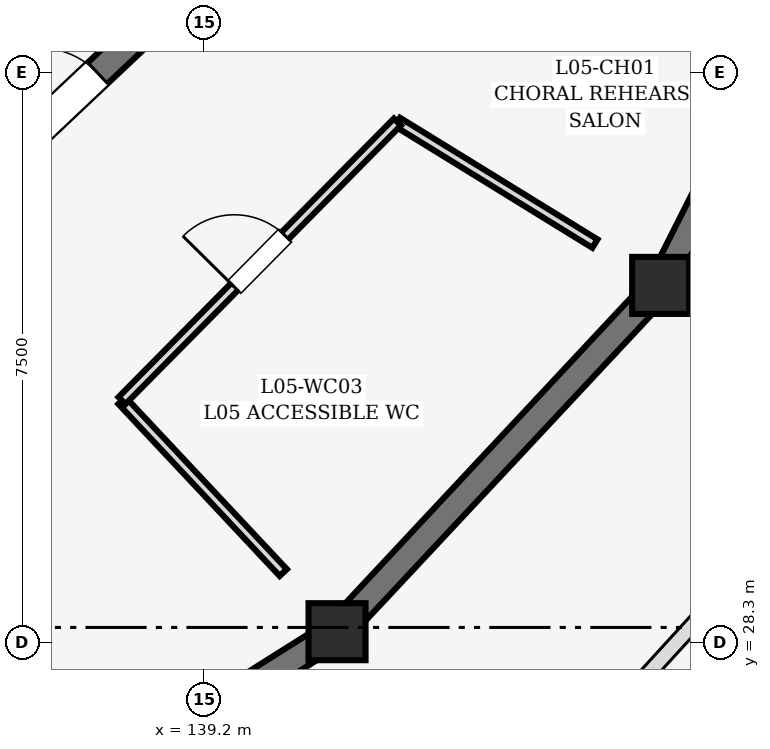
"""IFC4 building model, lengths in metres.
Left out: names, types, materials, properties, quantities, classifications, styles, units other than length and angle.
Written with IfcOpenShell. Run it as: python <this file> out.ifc"""

import sys

from ifc_helpers import new_model, si_unit, direction, frame, frame_2d, origin, origin_2d, place, context, subcontext, project, spatial, rectangle, circle, extrude, element, fill, save


model = new_model("IFC4")
c1 = context("Model", 3, precision=1e-05, world=origin(), true_north=direction((0.0, 1.0)))
c2 = subcontext(c1, "Body", "Model", "MODEL_VIEW")
j1 = project(units=[si_unit("LENGTHUNIT", "METRE"), si_unit("PLANEANGLEUNIT", "RADIAN")], contexts=[c1])
p1 = place(None, origin())
s1 = spatial("IfcSite", under=j1, at=p1, CompositionType="ELEMENT")
p2 = place(p1, origin())
s2 = spatial("IfcBuilding", under=s1, at=p2, CompositionType="ELEMENT")
p3 = place(p2, frame((0.0, 0.0, 19.2)))
s3 = spatial("IfcBuildingStorey", under=s2, at=p3, CompositionType="ELEMENT", Elevation=19.2)
for number, where, z_axis, x_axis in (
    (1, (140.951, 28.444, 0.0), (0.0, 0.0, 1.0), (1.0, 0.0, 0.0)),
    (2, (145.209, 33.0, 0.0), (0.0, 0.0, 1.0), (1.0, 0.0, 0.0)),
):
    element("IfcColumn", number, at=place(p3, frame(where, z_axis=z_axis, x_axis=x_axis)), inside=s3, PredefinedType="COLUMN", context=c2, shape_type="SweptSolid", body=[
        extrude(circle(Radius=0.375, at=origin_2d()), origin(), (0.0, 0.0, 1.0), 4.5),
    ])
p4 = place(p3, frame((135.662, 25.113, 0.0), z_axis=(0.0, 0.0, 1.0), x_axis=(0.846113390603, 0.53300293643, 0.0)))
e3 = element("IfcWall", 3, at=p4, inside=s3, PredefinedType="SHEAR", context=c2, shape_type="SweptSolid", body=[
    extrude(rectangle(XDim=5.94, YDim=0.35, at=frame_2d((2.97, 0.0))), origin(), (0.0, 0.0, 1.0), 4.23),
])
p5 = place(p3, frame((136.066, 34.155, 0.0), z_axis=(0.0, 0.0, 1.0), x_axis=(0.727127996206, 0.686501913423, 0.0)))
e4 = element("IfcWall", 4, at=p5, inside=s3, PredefinedType="SOLIDWALL", context=c2, shape_type="SweptSolid", body=[
    extrude(rectangle(XDim=3.714, YDim=0.38, at=frame_2d((1.857, 0.0))), origin(), (0.0, 0.0, 1.0), 4.25),
])
p6 = place(p5, frame((1.327, 0.0, 0.0)))
e5 = element("IfcOpeningElement", 5, at=p6, cuts=e4, PredefinedType="OPENING", context=c2, shape_type="SweptSolid", body=[
    extrude(rectangle(XDim=1.06, YDim=2.24, at=frame_2d((0.53, 1.12))), frame((0.0, 0.202, 0.0), z_axis=(0.0, -1.0, 0.0), x_axis=(1.0, 0.0, 0.0)), (0.0, 0.0, 1.0), 0.404),
])
p7 = place(p3, frame((141.162, 28.67, 0.0), z_axis=(0.0, 0.0, 1.0), x_axis=(0.682886399388, 0.730524582427, 0.0)))
e6 = element("IfcWall", 6, at=p7, inside=s3, PredefinedType="SHEAR", context=c2, shape_type="SweptSolid", body=[
    extrude(rectangle(XDim=5.617, YDim=0.35, at=frame_2d((2.809, 0.0))), origin(), (0.0, 0.0, 1.0), 4.23),
])
p8 = place(p3, frame((145.349, 33.277, 0.0), z_axis=(0.0, 0.0, 1.0), x_axis=(0.450512686904, 0.892770025784, 0.0)))
e7 = element("IfcWall", 7, at=p8, inside=s3, PredefinedType="SHEAR", context=c2, shape_type="SweptSolid", body=[
    extrude(rectangle(XDim=5.323, YDim=0.35, at=frame_2d((2.662, 0.0))), origin(), (0.0, 0.0, 1.0), 4.23),
])
p9 = place(p3, frame((138.122, 31.484, 0.0), z_axis=(0.0, 0.0, 1.0), x_axis=(0.683951602278, -0.72952738519, 0.0)))
e8 = element("IfcWall", 8, at=p9, inside=s3, PredefinedType="PARTITIONING", context=c2, shape_type="SweptSolid", body=[
    extrude(rectangle(XDim=3.102, YDim=0.13, at=frame_2d((1.551, 0.0))), origin(), (0.0, 0.0, 1.0), 3.734),
])
p10 = place(p3, frame((141.745, 35.15, 0.0), z_axis=(0.0, 0.0, 1.0), x_axis=(0.85151267833, -0.524334014386, 0.0)))
e9 = element("IfcWall", 9, at=p10, inside=s3, PredefinedType="PARTITIONING", context=c2, shape_type="SweptSolid", body=[
    extrude(rectangle(XDim=3.051, YDim=0.13, at=frame_2d((1.526, 0.0))), origin(), (0.0, 0.0, 1.0), 3.734),
])
p11 = place(p3, frame((138.122, 31.484, 0.0), z_axis=(0.0, 0.0, 1.0), x_axis=(0.702973842803, 0.711215703099, 0.0)))
e10 = element("IfcWall", 10, at=p11, inside=s3, PredefinedType="PARTITIONING", context=c2, shape_type="SweptSolid", body=[
    extrude(rectangle(XDim=5.154, YDim=0.13, at=frame_2d((2.577, 0.0))), origin(), (0.0, 0.0, 1.0), 4.265),
])
p12 = place(p11, frame((2.102, 0.0, 0.0)))
e11 = element("IfcOpeningElement", 11, at=p12, cuts=e10, PredefinedType="OPENING", context=c2, shape_type="SweptSolid", body=[
    extrude(rectangle(XDim=0.95, YDim=2.15, at=frame_2d((0.475, 1.075))), frame((0.0, 0.077, 0.0), z_axis=(0.0, -1.0, 0.0), x_axis=(1.0, 0.0, 0.0)), (0.0, 0.0, 1.0), 0.154),
])
p13 = place(p6, origin())
e12 = element("IfcDoor", 12, at=p13, inside=s3, OperationType="SINGLE_SWING_LEFT", PredefinedType="DOOR", context=c2, shape_type="SweptSolid", body=[
    extrude(rectangle(XDim=1.06, YDim=2.24, at=frame_2d((0.53, 1.12))), frame((0.0, 0.025, 0.0), z_axis=(0.0, -1.0, 0.0), x_axis=(1.0, 0.0, 0.0)), (0.0, 0.0, 1.0), 0.05),
])
fill(e5, e12)
p14 = place(p12, origin())
e13 = element("IfcDoor", 13, at=p14, inside=s3, OperationType="SINGLE_SWING_LEFT", PredefinedType="DOOR", context=c2, shape_type="SweptSolid", body=[
    extrude(rectangle(XDim=0.95, YDim=2.15, at=frame_2d((0.475, 1.075))), frame((0.0, 0.025, 0.0), z_axis=(0.0, -1.0, 0.0), x_axis=(1.0, 0.0, 0.0)), (0.0, 0.0, 1.0), 0.05),
])
fill(e11, e13)
save(model, sys.argv[1])
